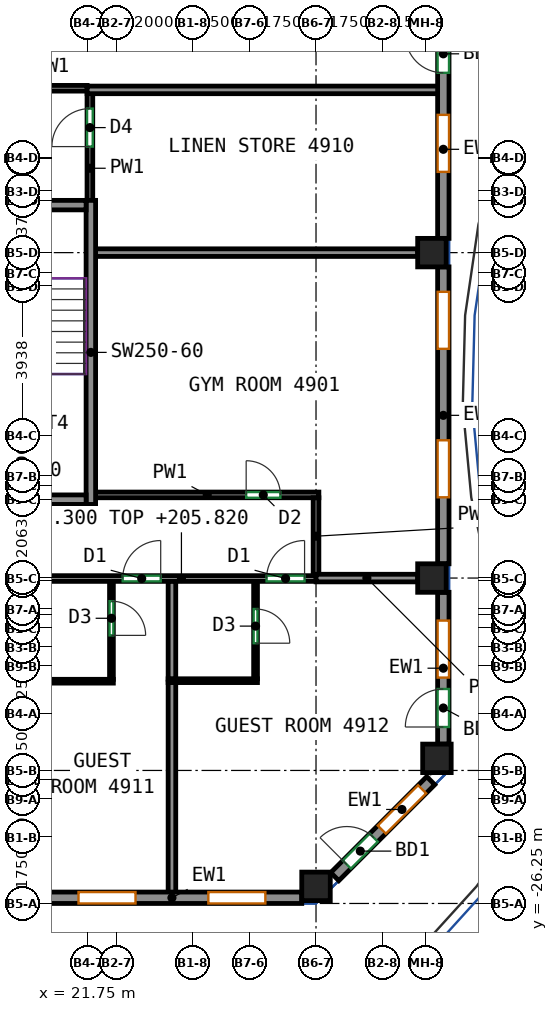
"""IFC4 building model, lengths in metres.
Left out: names, types, materials, properties, quantities, classifications, styles, units other than length and angle.
Written with IfcOpenShell. Run it as: python <this file> out.ifc"""

import sys

from ifc_helpers import new_model, si_unit, direction, frame, frame_2d, origin, origin_2d, place, context, subcontext, project, spatial, rectangle, extrude, source, transform, mapped, element, fill, save


model = new_model("IFC4")
c1 = context("Model", 3, precision=1e-05, world=origin(), true_north=direction((0.0, 1.0)))
c2 = subcontext(c1, "Body", "Model", "MODEL_VIEW")
j1 = project(units=[si_unit("LENGTHUNIT", "METRE"), si_unit("PLANEANGLEUNIT", "RADIAN")], contexts=[c1])
p1 = place(None, origin())
s1 = spatial("IfcSite", under=j1, at=p1, CompositionType="ELEMENT")
p2 = place(p1, origin())
s2 = spatial("IfcBuilding", under=s1, at=p2, CompositionType="ELEMENT")
p3 = place(p2, frame((0.0, 0.0, 203.3)))
s3 = spatial("IfcBuildingStorey", under=s2, at=p3, CompositionType="ELEMENT", Elevation=203.3)
m1 = source(origin(), c2, "Body", "SweptSolid", [
    extrude(rectangle(XDim=0.75, YDim=0.75, at=origin_2d()), origin(), (0.0, 0.0, 1.0), 3.12),
])
for number, where, z_axis, x_axis in (
    (1, (27.75, -25.8, 0.0), (0.0, 0.0, 1.0), (1.0, 0.0, 0.0)),
    (2, (30.8, -17.688, 0.0), (0.0, 0.0, 1.0), (1.0, 0.0, 0.0)),
    (3, (30.8, -9.125, 0.0), (0.0, 0.0, 1.0), (1.0, 0.0, 0.0)),
    (4, (30.932, -22.432, 0.0), (0.0, 0.0, 1.0), (1.0, 0.0, 0.0)),
):
    element("IfcColumn", number, at=place(p3, frame(where, z_axis=z_axis, x_axis=x_axis)), inside=s3, PredefinedType="COLUMN", context=c2, shape_type="MappedRepresentation", body=[
        mapped(m1, transform((0.0, 0.0, 0.0))),
    ])
m2 = source(origin(), c2, "Body", "SweptSolid", [
    extrude(rectangle(XDim=8.0, YDim=0.25, at=frame_2d((4.0, 0.0))), origin(), (0.0, 0.0, 1.0), 3.12),
])
p4 = place(p3, frame((21.825, -15.75, 0.0), z_axis=(0.0, 0.0, 1.0), x_axis=(0.0, 1.0, 0.0)))
e5 = element("IfcWall", 5, at=p4, inside=s3, PredefinedType="SHEAR", context=c2, shape_type="MappedRepresentation", body=[
    mapped(m2, transform((0.0, 0.0, 0.0))),
])
m3 = source(origin(), c2, "Body", "SweptSolid", [
    extrude(rectangle(XDim=3.7, YDim=0.25, at=frame_2d((1.85, 0.0))), origin(), (0.0, 0.0, 1.0), 3.12),
])
p5 = place(p3, frame((18.0, -15.625, 0.0), z_axis=(0.0, 0.0, 1.0), x_axis=(1.0, 0.0, 0.0)))
e6 = element("IfcWall", 6, at=p5, inside=s3, PredefinedType="SHEAR", context=c2, shape_type="MappedRepresentation", body=[
    mapped(m3, transform((0.0, 0.0, 0.0))),
])
p6 = place(p3, frame((18.0, -7.875, 0.0), z_axis=(0.0, 0.0, 1.0), x_axis=(1.0, 0.0, 0.0)))
e7 = element("IfcWall", 7, at=p6, inside=s3, PredefinedType="SHEAR", context=c2, shape_type="MappedRepresentation", body=[
    mapped(m3, transform((0.0, 0.0, 0.0))),
])
p7 = place(p6, frame((1.25, 0.0, 0.0)))
e8 = element("IfcOpeningElement", 8, at=p7, cuts=e7, PredefinedType="OPENING", context=c2, shape_type="SweptSolid", body=[
    extrude(rectangle(XDim=1.2, YDim=2.1, at=frame_2d((0.6, 1.05))), frame((0.0, 0.135, 0.0), z_axis=(0.0, -1.0, 0.0), x_axis=(1.0, 0.0, 0.0)), (0.0, 0.0, 1.0), 0.27),
])
m4 = source(origin(), c2, "Body", "SweptSolid", [
    extrude(rectangle(XDim=6.833, YDim=0.3, at=frame_2d((3.417, 0.0))), origin(), (0.0, 0.0, 1.0), 3.12),
])
p8 = place(p3, frame((20.542, -26.1, 0.0), z_axis=(0.0, 0.0, 1.0), x_axis=(1.0, 0.0, 0.0)))
e9 = element("IfcWall", 9, at=p8, inside=s3, PredefinedType="SOLIDWALL", context=c2, shape_type="MappedRepresentation", body=[
    mapped(m4, transform((0.0, 0.0, 0.0))),
])
p9 = place(p8, frame((0.958, 0.0, 0.85)))
e10 = element("IfcOpeningElement", 10, at=p9, cuts=e9, PredefinedType="OPENING", context=c2, shape_type="SweptSolid", body=[
    extrude(rectangle(XDim=1.5, YDim=1.95, at=frame_2d((0.75, 0.975))), frame((0.0, 0.16, 0.0), z_axis=(0.0, -1.0, 0.0), x_axis=(1.0, 0.0, 0.0)), (0.0, 0.0, 1.0), 0.32),
])
p10 = place(p8, frame((4.375, 0.0, 0.85)))
e11 = element("IfcOpeningElement", 11, at=p10, cuts=e9, PredefinedType="OPENING", context=c2, shape_type="SweptSolid", body=[
    extrude(rectangle(XDim=1.5, YDim=1.95, at=frame_2d((0.75, 0.975))), frame((0.0, 0.16, 0.0), z_axis=(0.0, -1.0, 0.0), x_axis=(1.0, 0.0, 0.0)), (0.0, 0.0, 1.0), 0.32),
])
m5 = source(origin(), c2, "Body", "SweptSolid", [
    extrude(rectangle(XDim=3.571, YDim=0.3, at=frame_2d((1.786, 0.0))), origin(), (0.0, 0.0, 1.0), 3.12),
])
p11 = place(p3, frame((28.244, -25.544, 0.0), z_axis=(0.0, 0.0, 1.0), x_axis=(0.707072595841, 0.707140964879, 0.0)))
e12 = element("IfcWall", 12, at=p11, inside=s3, PredefinedType="SOLIDWALL", context=c2, shape_type="MappedRepresentation", body=[
    mapped(m5, transform((0.0, 0.0, 0.0))),
])
p12 = place(p11, frame((1.75, 0.0, 0.85)))
e13 = element("IfcOpeningElement", 13, at=p12, cuts=e12, PredefinedType="OPENING", context=c2, shape_type="SweptSolid", body=[
    extrude(rectangle(XDim=1.5, YDim=1.95, at=frame_2d((0.75, 0.975))), frame((0.0, 0.16, 0.0), z_axis=(0.0, -1.0, 0.0), x_axis=(1.0, 0.0, 0.0)), (0.0, 0.0, 1.0), 0.32),
])
p13 = place(p11, frame((0.45, 0.0, 0.0)))
e14 = element("IfcOpeningElement", 14, at=p13, cuts=e12, PredefinedType="OPENING", context=c2, shape_type="SweptSolid", body=[
    extrude(rectangle(XDim=1.0, YDim=2.1, at=frame_2d((0.5, 1.05))), frame((0.0, 0.16, 0.0), z_axis=(0.0, -1.0, 0.0), x_axis=(1.0, 0.0, 0.0)), (0.0, 0.0, 1.0), 0.32),
])
m6 = source(origin(), c2, "Body", "SweptSolid", [
    extrude(rectangle(XDim=3.994, YDim=0.3, at=frame_2d((1.997, 0.0))), origin(), (0.0, 0.0, 1.0), 3.12),
])
p14 = place(p3, frame((31.1, -22.057, 0.0), z_axis=(0.0, 0.0, 1.0), x_axis=(0.0, 1.0, 0.0)))
e15 = element("IfcWall", 15, at=p14, inside=s3, PredefinedType="SOLIDWALL", context=c2, shape_type="MappedRepresentation", body=[
    mapped(m6, transform((0.0, 0.0, 0.0))),
])
p15 = place(p14, frame((1.75, 0.0, 0.85)))
e16 = element("IfcOpeningElement", 16, at=p15, cuts=e15, PredefinedType="OPENING", context=c2, shape_type="SweptSolid", body=[
    extrude(rectangle(XDim=1.5, YDim=1.95, at=frame_2d((0.75, 0.975))), frame((0.0, 0.16, 0.0), z_axis=(0.0, -1.0, 0.0), x_axis=(1.0, 0.0, 0.0)), (0.0, 0.0, 1.0), 0.32),
])
p16 = place(p14, frame((0.45, 0.0, 0.0)))
e17 = element("IfcOpeningElement", 17, at=p16, cuts=e15, PredefinedType="OPENING", context=c2, shape_type="SweptSolid", body=[
    extrude(rectangle(XDim=1.0, YDim=2.1, at=frame_2d((0.5, 1.05))), frame((0.0, 0.16, 0.0), z_axis=(0.0, -1.0, 0.0), x_axis=(1.0, 0.0, 0.0)), (0.0, 0.0, 1.0), 0.32),
])
m7 = source(origin(), c2, "Body", "SweptSolid", [
    extrude(rectangle(XDim=7.812, YDim=0.3, at=frame_2d((3.906, 0.0))), origin(), (0.0, 0.0, 1.0), 3.12),
])
p17 = place(p3, frame((31.1, -17.312, 0.0), z_axis=(0.0, 0.0, 1.0), x_axis=(0.0, 1.0, 0.0)))
e18 = element("IfcWall", 18, at=p17, inside=s3, PredefinedType="SOLIDWALL", context=c2, shape_type="MappedRepresentation", body=[
    mapped(m7, transform((0.0, 0.0, 0.0))),
])
p18 = place(p17, frame((1.75, 0.0, 0.85)))
e19 = element("IfcOpeningElement", 19, at=p18, cuts=e18, PredefinedType="OPENING", context=c2, shape_type="SweptSolid", body=[
    extrude(rectangle(XDim=1.5, YDim=1.95, at=frame_2d((0.75, 0.975))), frame((0.0, 0.16, 0.0), z_axis=(0.0, -1.0, 0.0), x_axis=(1.0, 0.0, 0.0)), (0.0, 0.0, 1.0), 0.32),
])
p19 = place(p17, frame((5.656, 0.0, 0.85)))
e20 = element("IfcOpeningElement", 20, at=p19, cuts=e18, PredefinedType="OPENING", context=c2, shape_type="SweptSolid", body=[
    extrude(rectangle(XDim=1.5, YDim=1.95, at=frame_2d((0.75, 0.975))), frame((0.0, 0.16, 0.0), z_axis=(0.0, -1.0, 0.0), x_axis=(1.0, 0.0, 0.0)), (0.0, 0.0, 1.0), 0.32),
])
p20 = place(p3, frame((31.1, -8.75, 0.0), z_axis=(0.0, 0.0, 1.0), x_axis=(0.0, 1.0, 0.0)))
e21 = element("IfcWall", 21, at=p20, inside=s3, PredefinedType="SOLIDWALL", context=c2, shape_type="MappedRepresentation", body=[
    mapped(m7, transform((0.0, 0.0, 0.0))),
])
p21 = place(p20, frame((1.75, 0.0, 0.85)))
e22 = element("IfcOpeningElement", 22, at=p21, cuts=e21, PredefinedType="OPENING", context=c2, shape_type="SweptSolid", body=[
    extrude(rectangle(XDim=1.5, YDim=1.95, at=frame_2d((0.75, 0.975))), frame((0.0, 0.16, 0.0), z_axis=(0.0, -1.0, 0.0), x_axis=(1.0, 0.0, 0.0)), (0.0, 0.0, 1.0), 0.32),
])
p22 = place(p20, frame((5.656, 0.0, 0.85)))
e23 = element("IfcOpeningElement", 23, at=p22, cuts=e21, PredefinedType="OPENING", context=c2, shape_type="SweptSolid", body=[
    extrude(rectangle(XDim=1.5, YDim=1.95, at=frame_2d((0.75, 0.975))), frame((0.0, 0.16, 0.0), z_axis=(0.0, -1.0, 0.0), x_axis=(1.0, 0.0, 0.0)), (0.0, 0.0, 1.0), 0.32),
])
p23 = place(p20, frame((4.356, 0.0, 0.0)))
e24 = element("IfcOpeningElement", 24, at=p23, cuts=e21, PredefinedType="OPENING", context=c2, shape_type="SweptSolid", body=[
    extrude(rectangle(XDim=1.0, YDim=2.1, at=frame_2d((0.5, 1.05))), frame((0.0, 0.16, 0.0), z_axis=(0.0, -1.0, 0.0), x_axis=(1.0, 0.0, 0.0)), (0.0, 0.0, 1.0), 0.32),
])
p24 = place(p3, frame((20.667, -17.7, 0.0), z_axis=(0.0, 0.0, 1.0), x_axis=(1.0, 0.0, 0.0)))
e25 = element("IfcWall", 25, at=p24, inside=s3, PredefinedType="PARTITIONING", context=c2, shape_type="SweptSolid", body=[
    extrude(rectangle(XDim=7.083, YDim=0.15, at=frame_2d((3.542, 0.0))), origin(), (0.0, 0.0, 1.0), 2.52),
])
p25 = place(p24, frame((1.996, 0.0, 0.0)))
e26 = element("IfcOpeningElement", 26, at=p25, cuts=e25, PredefinedType="OPENING", context=c2, shape_type="SweptSolid", body=[
    extrude(rectangle(XDim=1.0, YDim=2.1, at=frame_2d((0.5, 1.05))), frame((0.0, 0.085, 0.0), z_axis=(0.0, -1.0, 0.0), x_axis=(1.0, 0.0, 0.0)), (0.0, 0.0, 1.0), 0.17),
])
p26 = place(p24, frame((5.782, 0.0, 0.0)))
e27 = element("IfcOpeningElement", 27, at=p26, cuts=e25, PredefinedType="OPENING", context=c2, shape_type="SweptSolid", body=[
    extrude(rectangle(XDim=1.0, YDim=2.1, at=frame_2d((0.5, 1.05))), frame((0.0, 0.085, 0.0), z_axis=(0.0, -1.0, 0.0), x_axis=(1.0, 0.0, 0.0)), (0.0, 0.0, 1.0), 0.17),
])
p27 = place(p3, frame((17.925, -4.8, 0.0), z_axis=(0.0, 0.0, 1.0), x_axis=(1.0, 0.0, 0.0)))
e28 = element("IfcWall", 28, at=p27, inside=s3, PredefinedType="PARTITIONING", context=c2, shape_type="SweptSolid", body=[
    extrude(rectangle(XDim=3.802, YDim=0.15, at=frame_2d((1.901, 0.0))), origin(), (0.0, 0.0, 1.0), 3.12),
])
p28 = place(p3, frame((21.8, -7.75, 0.0), z_axis=(0.0, 0.0, 1.0), x_axis=(0.0, 1.0, 0.0)))
e29 = element("IfcWall", 29, at=p28, inside=s3, PredefinedType="PARTITIONING", context=c2, shape_type="SweptSolid", body=[
    extrude(rectangle(XDim=2.817, YDim=0.15, at=frame_2d((1.408, 0.0))), origin(), (0.0, 0.0, 1.0), 3.12),
])
p29 = place(p28, frame((1.415, 0.0, 0.0)))
e30 = element("IfcOpeningElement", 30, at=p29, cuts=e29, PredefinedType="OPENING", context=c2, shape_type="SweptSolid", body=[
    extrude(rectangle(XDim=1.0, YDim=2.1, at=frame_2d((0.5, 1.05))), frame((0.0, 0.085, 0.0), z_axis=(0.0, -1.0, 0.0), x_axis=(1.0, 0.0, 0.0)), (0.0, 0.0, 1.0), 0.17),
])
p30 = place(p3, frame((21.95, -15.5, 0.0), z_axis=(0.0, 0.0, 1.0), x_axis=(1.0, 0.0, 0.0)))
e31 = element("IfcWall", 31, at=p30, inside=s3, PredefinedType="PARTITIONING", context=c2, shape_type="SweptSolid", body=[
    extrude(rectangle(XDim=5.875, YDim=0.15, at=frame_2d((2.938, 0.0))), origin(), (0.0, 0.0, 1.0), 3.12),
])
p31 = place(p30, frame((3.962, 0.0, 0.0)))
e32 = element("IfcOpeningElement", 32, at=p31, cuts=e31, PredefinedType="OPENING", context=c2, shape_type="SweptSolid", body=[
    extrude(rectangle(XDim=0.9, YDim=2.1, at=frame_2d((0.45, 1.05))), frame((0.0, 0.085, 0.0), z_axis=(0.0, -1.0, 0.0), x_axis=(1.0, 0.0, 0.0)), (0.0, 0.0, 1.0), 0.17),
])
p32 = place(p3, frame((27.75, -17.598, 0.0), z_axis=(0.0, 0.0, 1.0), x_axis=(0.0, 1.0, 0.0)))
e33 = element("IfcWall", 33, at=p32, inside=s3, PredefinedType="PARTITIONING", context=c2, shape_type="SweptSolid", body=[
    extrude(rectangle(XDim=2.023, YDim=0.15, at=frame_2d((1.011, 0.0))), origin(), (0.0, 0.0, 1.0), 2.52),
])
p33 = place(p3, frame((17.917, -20.402, 0.0), z_axis=(0.0, 0.0, 1.0), x_axis=(1.0, 0.0, 0.0)))
e34 = element("IfcWall", 34, at=p33, inside=s3, PredefinedType="PARTITIONING", context=c2, shape_type="SweptSolid", body=[
    extrude(rectangle(XDim=4.5, YDim=0.1, at=frame_2d((2.25, 0.0))), origin(), (0.0, 0.0, 1.0), 3.12),
])
p34 = place(p3, frame((22.367, -17.777, 0.0), z_axis=(0.0, 0.0, 1.0), x_axis=(0.0, -1.0, 0.0)))
e35 = element("IfcWall", 35, at=p34, inside=s3, PredefinedType="PARTITIONING", context=c2, shape_type="SweptSolid", body=[
    extrude(rectangle(XDim=2.575, YDim=0.1, at=frame_2d((1.288, 0.0))), origin(), (0.0, 0.0, 1.0), 3.12),
])
p35 = place(p34, frame((0.519, 0.0, 0.0)))
e36 = element("IfcOpeningElement", 36, at=p35, cuts=e35, PredefinedType="OPENING", context=c2, shape_type="SweptSolid", body=[
    extrude(rectangle(XDim=0.9, YDim=2.1, at=frame_2d((0.45, 1.05))), frame((0.0, 0.06, 0.0), z_axis=(0.0, -1.0, 0.0), x_axis=(1.0, 0.0, 0.0)), (0.0, 0.0, 1.0), 0.12),
])
p36 = place(p3, frame((23.959, -26.0, 0.0), z_axis=(0.0, 0.0, 1.0), x_axis=(0.0, 1.0, 0.0)))
e37 = element("IfcWall", 37, at=p36, inside=s3, PredefinedType="PARTITIONING", context=c2, shape_type="SweptSolid", body=[
    extrude(rectangle(XDim=5.572, YDim=0.2, at=frame_2d((2.786, 0.0))), origin(), (0.0, 0.0, 1.0), 3.12),
])
p37 = place(p3, frame((23.959, -20.348, 0.0), z_axis=(0.0, 0.0, 1.0), x_axis=(0.0, 1.0, 0.0)))
e38 = element("IfcWall", 38, at=p37, inside=s3, PredefinedType="PARTITIONING", context=c2, shape_type="SweptSolid", body=[
    extrude(rectangle(XDim=2.571, YDim=0.2, at=frame_2d((1.285, 0.0))), origin(), (0.0, 0.0, 1.0), 3.12),
])
p38 = place(p3, frame((23.859, -20.388, 0.0), z_axis=(0.0, 0.0, 1.0), x_axis=(1.0, 0.0, 0.0)))
e39 = element("IfcWall", 39, at=p38, inside=s3, PredefinedType="PARTITIONING", context=c2, shape_type="SweptSolid", body=[
    extrude(rectangle(XDim=2.35, YDim=0.1, at=frame_2d((1.175, 0.0))), origin(), (0.0, 0.0, 1.0), 3.12),
])
p39 = place(p3, frame((26.159, -17.777, 0.0), z_axis=(0.0, 0.0, 1.0), x_axis=(0.0, -1.0, 0.0)))
e40 = element("IfcWall", 40, at=p39, inside=s3, PredefinedType="PARTITIONING", context=c2, shape_type="SweptSolid", body=[
    extrude(rectangle(XDim=2.561, YDim=0.1, at=frame_2d((1.28, 0.0))), origin(), (0.0, 0.0, 1.0), 3.12),
])
p40 = place(p39, frame((0.725, 0.0, 0.0)))
e41 = element("IfcOpeningElement", 41, at=p40, cuts=e40, PredefinedType="OPENING", context=c2, shape_type="SweptSolid", body=[
    extrude(rectangle(XDim=0.9, YDim=2.1, at=frame_2d((0.45, 1.05))), frame((0.0, 0.06, 0.0), z_axis=(0.0, -1.0, 0.0), x_axis=(1.0, 0.0, 0.0)), (0.0, 0.0, 1.0), 0.12),
])
p41 = place(p3, frame((27.752, -17.688, 0.0), z_axis=(0.0, 0.0, 1.0), x_axis=(1.0, 0.0, 0.0)))
e42 = element("IfcWall", 42, at=p41, inside=s3, PredefinedType="PARTITIONING", context=c2, shape_type="SweptSolid", body=[
    extrude(rectangle(XDim=2.673, YDim=0.2, at=frame_2d((1.336, 0.0))), origin(), (0.0, 0.0, 1.0), 2.52),
])
p42 = place(p3, frame((21.727, -4.843, 0.0), z_axis=(0.0, 0.0, 1.0), x_axis=(1.0, 0.0, 0.0)))
e43 = element("IfcWall", 43, at=p42, inside=s3, PredefinedType="PARTITIONING", context=c2, shape_type="SweptSolid", body=[
    extrude(rectangle(XDim=9.273, YDim=0.2, at=frame_2d((4.636, 0.0))), origin(), (0.0, 0.0, 1.0), 3.12),
])
p43 = place(p3, frame((21.95, -9.125, 0.0), z_axis=(0.0, 0.0, 1.0), x_axis=(1.0, 0.0, 0.0)))
e44 = element("IfcWall", 44, at=p43, inside=s3, PredefinedType="PARTITIONING", context=c2, shape_type="SweptSolid", body=[
    extrude(rectangle(XDim=8.475, YDim=0.2, at=frame_2d((4.238, 0.0))), origin(), (0.0, 0.0, 1.0), 3.12),
])
p44 = place(p9, origin())
e45 = element("IfcWindow", 45, at=p44, inside=s3, PartitioningType="SINGLE_PANEL", PredefinedType="WINDOW", context=c2, shape_type="SweptSolid", body=[
    extrude(rectangle(XDim=1.5, YDim=1.95, at=frame_2d((0.75, 0.975))), frame((0.0, 0.03, 0.0), z_axis=(0.0, -1.0, 0.0), x_axis=(1.0, 0.0, 0.0)), (0.0, 0.0, 1.0), 0.06),
])
fill(e10, e45)
p45 = place(p10, origin())
e46 = element("IfcWindow", 46, at=p45, inside=s3, PartitioningType="SINGLE_PANEL", PredefinedType="WINDOW", context=c2, shape_type="SweptSolid", body=[
    extrude(rectangle(XDim=1.5, YDim=1.95, at=frame_2d((0.75, 0.975))), frame((0.0, 0.03, 0.0), z_axis=(0.0, -1.0, 0.0), x_axis=(1.0, 0.0, 0.0)), (0.0, 0.0, 1.0), 0.06),
])
fill(e11, e46)
p46 = place(p12, origin())
e47 = element("IfcWindow", 47, at=p46, inside=s3, PartitioningType="SINGLE_PANEL", PredefinedType="WINDOW", context=c2, shape_type="SweptSolid", body=[
    extrude(rectangle(XDim=1.5, YDim=1.95, at=frame_2d((0.75, 0.975))), frame((0.0, 0.03, 0.0), z_axis=(0.0, -1.0, 0.0), x_axis=(1.0, 0.0, 0.0)), (0.0, 0.0, 1.0), 0.06),
])
fill(e13, e47)
p47 = place(p13, origin())
e48 = element("IfcDoor", 48, at=p47, inside=s3, OperationType="SINGLE_SWING_LEFT", PredefinedType="DOOR", context=c2, shape_type="SweptSolid", body=[
    extrude(rectangle(XDim=1.0, YDim=2.1, at=frame_2d((0.5, 1.05))), frame((0.0, 0.025, 0.0), z_axis=(0.0, -1.0, 0.0), x_axis=(1.0, 0.0, 0.0)), (0.0, 0.0, 1.0), 0.05),
])
fill(e14, e48)
p48 = place(p15, origin())
e49 = element("IfcWindow", 49, at=p48, inside=s3, PartitioningType="SINGLE_PANEL", PredefinedType="WINDOW", context=c2, shape_type="SweptSolid", body=[
    extrude(rectangle(XDim=1.5, YDim=1.95, at=frame_2d((0.75, 0.975))), frame((0.0, 0.03, 0.0), z_axis=(0.0, -1.0, 0.0), x_axis=(1.0, 0.0, 0.0)), (0.0, 0.0, 1.0), 0.06),
])
fill(e16, e49)
p49 = place(p16, origin())
e50 = element("IfcDoor", 50, at=p49, inside=s3, OperationType="SINGLE_SWING_LEFT", PredefinedType="DOOR", context=c2, shape_type="SweptSolid", body=[
    extrude(rectangle(XDim=1.0, YDim=2.1, at=frame_2d((0.5, 1.05))), frame((0.0, 0.025, 0.0), z_axis=(0.0, -1.0, 0.0), x_axis=(1.0, 0.0, 0.0)), (0.0, 0.0, 1.0), 0.05),
])
fill(e17, e50)
p50 = place(p18, origin())
e51 = element("IfcWindow", 51, at=p50, inside=s3, PartitioningType="SINGLE_PANEL", PredefinedType="WINDOW", context=c2, shape_type="SweptSolid", body=[
    extrude(rectangle(XDim=1.5, YDim=1.95, at=frame_2d((0.75, 0.975))), frame((0.0, 0.03, 0.0), z_axis=(0.0, -1.0, 0.0), x_axis=(1.0, 0.0, 0.0)), (0.0, 0.0, 1.0), 0.06),
])
fill(e19, e51)
p51 = place(p19, origin())
e52 = element("IfcWindow", 52, at=p51, inside=s3, PartitioningType="SINGLE_PANEL", PredefinedType="WINDOW", context=c2, shape_type="SweptSolid", body=[
    extrude(rectangle(XDim=1.5, YDim=1.95, at=frame_2d((0.75, 0.975))), frame((0.0, 0.03, 0.0), z_axis=(0.0, -1.0, 0.0), x_axis=(1.0, 0.0, 0.0)), (0.0, 0.0, 1.0), 0.06),
])
fill(e20, e52)
p52 = place(p21, origin())
e53 = element("IfcWindow", 53, at=p52, inside=s3, PartitioningType="SINGLE_PANEL", PredefinedType="WINDOW", context=c2, shape_type="SweptSolid", body=[
    extrude(rectangle(XDim=1.5, YDim=1.95, at=frame_2d((0.75, 0.975))), frame((0.0, 0.03, 0.0), z_axis=(0.0, -1.0, 0.0), x_axis=(1.0, 0.0, 0.0)), (0.0, 0.0, 1.0), 0.06),
])
fill(e22, e53)
p53 = place(p23, origin())
e54 = element("IfcDoor", 54, at=p53, inside=s3, OperationType="SINGLE_SWING_RIGHT", PredefinedType="DOOR", context=c2, shape_type="SweptSolid", body=[
    extrude(rectangle(XDim=1.0, YDim=2.1, at=frame_2d((0.5, 1.05))), frame((0.0, 0.025, 0.0), z_axis=(0.0, -1.0, 0.0), x_axis=(1.0, 0.0, 0.0)), (0.0, 0.0, 1.0), 0.05),
])
fill(e24, e54)
p54 = place(p40, origin())
e55 = element("IfcDoor", 55, at=p54, inside=s3, OperationType="SINGLE_SWING_RIGHT", PredefinedType="DOOR", context=c2, shape_type="SweptSolid", body=[
    extrude(rectangle(XDim=0.9, YDim=2.1, at=frame_2d((0.45, 1.05))), frame((0.0, 0.025, 0.0), z_axis=(0.0, -1.0, 0.0), x_axis=(1.0, 0.0, 0.0)), (0.0, 0.0, 1.0), 0.05),
])
fill(e41, e55)
p55 = place(p35, origin())
e56 = element("IfcDoor", 56, at=p55, inside=s3, OperationType="SINGLE_SWING_RIGHT", PredefinedType="DOOR", context=c2, shape_type="SweptSolid", body=[
    extrude(rectangle(XDim=0.9, YDim=2.1, at=frame_2d((0.45, 1.05))), frame((0.0, 0.025, 0.0), z_axis=(0.0, -1.0, 0.0), x_axis=(1.0, 0.0, 0.0)), (0.0, 0.0, 1.0), 0.05),
])
fill(e36, e56)
p56 = place(p25, origin())
e57 = element("IfcDoor", 57, at=p56, inside=s3, OperationType="SINGLE_SWING_RIGHT", PredefinedType="DOOR", context=c2, shape_type="SweptSolid", body=[
    extrude(rectangle(XDim=1.0, YDim=2.1, at=frame_2d((0.5, 1.05))), frame((0.0, 0.025, 0.0), z_axis=(0.0, -1.0, 0.0), x_axis=(1.0, 0.0, 0.0)), (0.0, 0.0, 1.0), 0.05),
])
fill(e26, e57)
p57 = place(p26, origin())
e58 = element("IfcDoor", 58, at=p57, inside=s3, OperationType="SINGLE_SWING_RIGHT", PredefinedType="DOOR", context=c2, shape_type="SweptSolid", body=[
    extrude(rectangle(XDim=1.0, YDim=2.1, at=frame_2d((0.5, 1.05))), frame((0.0, 0.025, 0.0), z_axis=(0.0, -1.0, 0.0), x_axis=(1.0, 0.0, 0.0)), (0.0, 0.0, 1.0), 0.05),
])
fill(e27, e58)
p58 = place(p31, origin())
e59 = element("IfcDoor", 59, at=p58, inside=s3, OperationType="SINGLE_SWING_LEFT", PredefinedType="DOOR", context=c2, shape_type="SweptSolid", body=[
    extrude(rectangle(XDim=0.9, YDim=2.1, at=frame_2d((0.45, 1.05))), frame((0.0, 0.025, 0.0), z_axis=(0.0, -1.0, 0.0), x_axis=(1.0, 0.0, 0.0)), (0.0, 0.0, 1.0), 0.05),
])
fill(e32, e59)
p59 = place(p29, origin())
e60 = element("IfcDoor", 60, at=p59, inside=s3, OperationType="SINGLE_SWING_LEFT", PredefinedType="DOOR", context=c2, shape_type="SweptSolid", body=[
    extrude(rectangle(XDim=1.0, YDim=2.1, at=frame_2d((0.5, 1.05))), frame((0.0, 0.025, 0.0), z_axis=(0.0, -1.0, 0.0), x_axis=(1.0, 0.0, 0.0)), (0.0, 0.0, 1.0), 0.05),
])
fill(e30, e60)
save(model, sys.argv[1])
